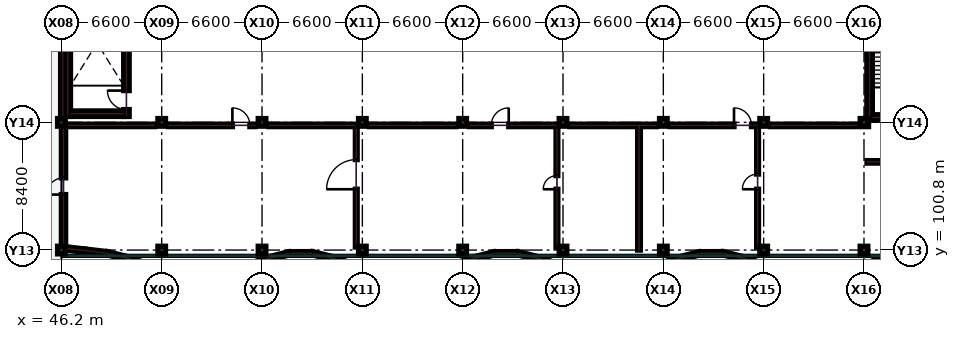
"""IFC4 building model, lengths in metres.
Left out: names, types, materials, properties, quantities, classifications, styles, units other than length and angle.
Written with IfcOpenShell. Run it as: python <this file> out.ifc"""

import sys

from ifc_helpers import new_model, si_unit, direction, frame, frame_2d, origin, origin_2d, place, context, subcontext, project, spatial, rectangle, extrude, element, fill, save


model = new_model("IFC4")
c1 = context("Model", 3, precision=1e-05, world=origin(), true_north=direction((0.0, 1.0)))
c2 = subcontext(c1, "Body", "Model", "MODEL_VIEW")
j1 = project(units=[si_unit("LENGTHUNIT", "METRE"), si_unit("PLANEANGLEUNIT", "RADIAN")], contexts=[c1])
p1 = place(None, origin())
s1 = spatial("IfcSite", under=j1, at=p1, CompositionType="ELEMENT")
p2 = place(p1, origin())
s2 = spatial("IfcBuilding", under=s1, at=p2, CompositionType="ELEMENT")
p3 = place(p2, frame((0.0, 0.0, 18.6)))
s3 = spatial("IfcBuildingStorey", under=s2, at=p3, CompositionType="ELEMENT", Elevation=18.6)
for number, where, z_axis, x_axis in (
    (1, (46.2, 100.8, 0.0), (0.0, 0.0, 1.0), (1.0, 0.0, 0.0)),
    (2, (46.2, 109.2, 0.0), (0.0, 0.0, 1.0), (1.0, 0.0, 0.0)),
    (3, (52.8, 100.8, 0.0), (0.0, 0.0, 1.0), (1.0, 0.0, 0.0)),
    (4, (52.8, 109.2, 0.0), (0.0, 0.0, 1.0), (1.0, 0.0, 0.0)),
    (5, (59.4, 100.8, 0.0), (0.0, 0.0, 1.0), (1.0, 0.0, 0.0)),
    (6, (59.4, 109.2, 0.0), (0.0, 0.0, 1.0), (1.0, 0.0, 0.0)),
    (7, (66.0, 100.8, 0.0), (0.0, 0.0, 1.0), (1.0, 0.0, 0.0)),
    (8, (66.0, 109.2, 0.0), (0.0, 0.0, 1.0), (1.0, 0.0, 0.0)),
    (9, (72.6, 100.8, 0.0), (0.0, 0.0, 1.0), (1.0, 0.0, 0.0)),
    (10, (72.6, 109.2, 0.0), (0.0, 0.0, 1.0), (1.0, 0.0, 0.0)),
    (11, (79.2, 100.8, 0.0), (0.0, 0.0, 1.0), (1.0, 0.0, 0.0)),
    (12, (79.2, 109.2, 0.0), (0.0, 0.0, 1.0), (1.0, 0.0, 0.0)),
    (13, (85.8, 100.8, 0.0), (0.0, 0.0, 1.0), (1.0, 0.0, 0.0)),
    (14, (85.8, 109.2, 0.0), (0.0, 0.0, 1.0), (1.0, 0.0, 0.0)),
    (15, (92.4, 100.8, 0.0), (0.0, 0.0, 1.0), (1.0, 0.0, 0.0)),
    (16, (92.4, 109.2, 0.0), (0.0, 0.0, 1.0), (1.0, 0.0, 0.0)),
    (17, (99.0, 100.8, 0.0), (0.0, 0.0, 1.0), (1.0, 0.0, 0.0)),
    (18, (99.0, 109.2, 0.0), (0.0, 0.0, 1.0), (1.0, 0.0, 0.0)),
):
    element("IfcColumn", number, at=place(p3, frame(where, z_axis=z_axis, x_axis=x_axis)), inside=s3, PredefinedType="COLUMN", context=c2, shape_type="SweptSolid", body=[
        extrude(rectangle(XDim=0.5, YDim=0.5, at=origin_2d()), origin(), (0.0, 0.0, 1.0), 4.2),
    ])
p4 = place(p3, frame((46.48, 109.0, 0.0), z_axis=(0.0, 0.0, 1.0), x_axis=(1.0, 0.0, 0.0)))
e19 = element("IfcWall", 19, at=p4, inside=s3, PredefinedType="PARTITIONING", context=c2, shape_type="SweptSolid", body=[
    extrude(rectangle(XDim=5.87, YDim=0.16, at=frame_2d((2.935, 0.0))), origin(), (0.0, 0.0, 1.0), 3.175),
])
p5 = place(p3, frame((53.25, 109.0, 0.0), z_axis=(0.0, 0.0, 1.0), x_axis=(1.0, 0.0, 0.0)))
e20 = element("IfcWall", 20, at=p5, inside=s3, PredefinedType="PARTITIONING", context=c2, shape_type="SweptSolid", body=[
    extrude(rectangle(XDim=5.7, YDim=0.16, at=frame_2d((2.85, 0.0))), origin(), (0.0, 0.0, 1.0), 3.175),
])
p6 = place(p5, frame((4.2, 0.0, 0.0)))
e21 = element("IfcOpeningElement", 21, at=p6, cuts=e20, PredefinedType="OPENING", context=c2, shape_type="SweptSolid", body=[
    extrude(rectangle(XDim=1.15, YDim=2.2, at=frame_2d((0.575, 1.1))), frame((0.0, 0.09, 0.0), z_axis=(0.0, -1.0, 0.0), x_axis=(1.0, 0.0, 0.0)), (0.0, 0.0, 1.0), 0.18),
])
for number, where, z_axis, x_axis in (
    (22, (59.85, 109.0, 0.0), (0.0, 0.0, 1.0), (1.0, 0.0, 0.0)),
    (23, (66.45, 109.0, 0.0), (0.0, 0.0, 1.0), (1.0, 0.0, 0.0)),
):
    element("IfcWall", number, at=place(p3, frame(where, z_axis=z_axis, x_axis=x_axis)), inside=s3, PredefinedType="PARTITIONING", context=c2, shape_type="SweptSolid", body=[
        extrude(rectangle(XDim=5.7, YDim=0.16, at=frame_2d((2.85, 0.0))), origin(), (0.0, 0.0, 1.0), 3.175),
    ])
p7 = place(p3, frame((73.05, 109.0, 0.0), z_axis=(0.0, 0.0, 1.0), x_axis=(1.0, 0.0, 0.0)))
e24 = element("IfcWall", 24, at=p7, inside=s3, PredefinedType="PARTITIONING", context=c2, shape_type="SweptSolid", body=[
    extrude(rectangle(XDim=5.7, YDim=0.16, at=frame_2d((2.85, 0.0))), origin(), (0.0, 0.0, 1.0), 3.175),
])
p8 = place(p7, frame((1.43, 0.0, 0.0)))
e25 = element("IfcOpeningElement", 25, at=p8, cuts=e24, PredefinedType="OPENING", context=c2, shape_type="SweptSolid", body=[
    extrude(rectangle(XDim=1.15, YDim=2.2, at=frame_2d((0.575, 1.1))), frame((0.0, 0.09, 0.0), z_axis=(0.0, -1.0, 0.0), x_axis=(1.0, 0.0, 0.0)), (0.0, 0.0, 1.0), 0.18),
])
p9 = place(p3, frame((79.65, 109.0, 0.0), z_axis=(0.0, 0.0, 1.0), x_axis=(1.0, 0.0, 0.0)))
e26 = element("IfcWall", 26, at=p9, inside=s3, PredefinedType="PARTITIONING", context=c2, shape_type="SweptSolid", body=[
    extrude(rectangle(XDim=5.7, YDim=0.16, at=frame_2d((2.85, 0.0))), origin(), (0.0, 0.0, 1.0), 3.175),
])
p10 = place(p3, frame((86.25, 109.0, 0.0), z_axis=(0.0, 0.0, 1.0), x_axis=(1.0, 0.0, 0.0)))
e27 = element("IfcWall", 27, at=p10, inside=s3, PredefinedType="PARTITIONING", context=c2, shape_type="SweptSolid", body=[
    extrude(rectangle(XDim=5.7, YDim=0.16, at=frame_2d((2.85, 0.0))), origin(), (0.0, 0.0, 1.0), 3.175),
])
p11 = place(p10, frame((4.2, 0.0, 0.0)))
e28 = element("IfcOpeningElement", 28, at=p11, cuts=e27, PredefinedType="OPENING", context=c2, shape_type="SweptSolid", body=[
    extrude(rectangle(XDim=1.15, YDim=2.2, at=frame_2d((0.575, 1.1))), frame((0.0, 0.09, 0.0), z_axis=(0.0, -1.0, 0.0), x_axis=(1.0, 0.0, 0.0)), (0.0, 0.0, 1.0), 0.18),
])
p12 = place(p3, frame((92.85, 109.0, 0.0), z_axis=(0.0, 0.0, 1.0), x_axis=(1.0, 0.0, 0.0)))
e29 = element("IfcWall", 29, at=p12, inside=s3, PredefinedType="PARTITIONING", context=c2, shape_type="SweptSolid", body=[
    extrude(rectangle(XDim=6.45, YDim=0.16, at=frame_2d((3.225, 0.0))), origin(), (0.0, 0.0, 1.0), 3.175),
])
p13 = place(p3, frame((84.2, 100.8, 0.0), z_axis=(0.0, 0.0, 1.0), x_axis=(0.0, 1.0, 0.0)))
e30 = element("IfcWall", 30, at=p13, inside=s3, PredefinedType="SOLIDWALL", context=c2, shape_type="SweptSolid", body=[
    extrude(rectangle(XDim=8.2, YDim=0.18, at=frame_2d((4.1, 0.0))), origin(), (0.0, 0.0, 1.0), 3.19),
])
p14 = place(p3, frame((65.6, 101.0, 0.0), z_axis=(0.0, 0.0, 1.0), x_axis=(0.0, 1.0, 0.0)))
e31 = element("IfcWall", 31, at=p14, inside=s3, PredefinedType="PARTITIONING", context=c2, shape_type="SweptSolid", body=[
    extrude(rectangle(XDim=8.0, YDim=0.12, at=frame_2d((4.0, 0.0))), origin(), (0.0, 0.0, 1.0), 3.19),
])
p15 = place(p14, frame((3.8, 0.0, 0.0)))
e32 = element("IfcOpeningElement", 32, at=p15, cuts=e31, PredefinedType="OPENING", context=c2, shape_type="SweptSolid", body=[
    extrude(rectangle(XDim=1.95, YDim=2.35, at=frame_2d((0.975, 1.175))), frame((0.0, 0.07, 0.0), z_axis=(0.0, -1.0, 0.0), x_axis=(1.0, 0.0, 0.0)), (0.0, 0.0, 1.0), 0.14),
])
p16 = place(p3, frame((78.8, 101.0, 0.0), z_axis=(0.0, 0.0, 1.0), x_axis=(0.0, 1.0, 0.0)))
e33 = element("IfcWall", 33, at=p16, inside=s3, PredefinedType="PARTITIONING", context=c2, shape_type="SweptSolid", body=[
    extrude(rectangle(XDim=8.0, YDim=0.12, at=frame_2d((4.0, 0.0))), origin(), (0.0, 0.0, 1.0), 3.19),
])
p17 = place(p16, frame((3.8, 0.0, 0.0)))
e34 = element("IfcOpeningElement", 34, at=p17, cuts=e33, PredefinedType="OPENING", context=c2, shape_type="SweptSolid", body=[
    extrude(rectangle(XDim=0.9, YDim=2.1, at=frame_2d((0.45, 1.05))), frame((0.0, 0.07, 0.0), z_axis=(0.0, -1.0, 0.0), x_axis=(1.0, 0.0, 0.0)), (0.0, 0.0, 1.0), 0.14),
])
p18 = place(p3, frame((92.0, 101.0, 0.0), z_axis=(0.0, 0.0, 1.0), x_axis=(0.0, 1.0, 0.0)))
e35 = element("IfcWall", 35, at=p18, inside=s3, PredefinedType="PARTITIONING", context=c2, shape_type="SweptSolid", body=[
    extrude(rectangle(XDim=8.0, YDim=0.12, at=frame_2d((4.0, 0.0))), origin(), (0.0, 0.0, 1.0), 3.19),
])
p19 = place(p18, frame((3.8, 0.0, 0.0)))
e36 = element("IfcOpeningElement", 36, at=p19, cuts=e35, PredefinedType="OPENING", context=c2, shape_type="SweptSolid", body=[
    extrude(rectangle(XDim=1.0, YDim=2.2, at=frame_2d((0.5, 1.1))), frame((0.0, 0.07, 0.0), z_axis=(0.0, -1.0, 0.0), x_axis=(1.0, 0.0, 0.0)), (0.0, 0.0, 1.0), 0.14),
])
p20 = place(p3, frame((99.2, 106.6, 0.0), z_axis=(0.0, 0.0, 1.0), x_axis=(1.0, 0.0, 0.0)))
e37 = element("IfcWall", 37, at=p20, inside=s3, PredefinedType="PARTITIONING", context=c2, shape_type="SweptSolid", body=[
    extrude(rectangle(XDim=12.9, YDim=0.16, at=frame_2d((6.45, 0.0))), origin(), (0.0, 0.0, 1.0), 3.19),
])
p21 = place(p20, frame((4.2, 0.0, 0.0)))
e38 = element("IfcOpeningElement", 38, at=p21, cuts=e37, PredefinedType="OPENING", context=c2, shape_type="SweptSolid", body=[
    extrude(rectangle(XDim=1.05, YDim=2.15, at=frame_2d((0.525, 1.075))), frame((0.0, 0.09, 0.0), z_axis=(0.0, -1.0, 0.0), x_axis=(1.0, 0.0, 0.0)), (0.0, 0.0, 1.0), 0.18),
])
p22 = place(p3, frame((46.34, 108.955, 0.0), z_axis=(0.0, 0.0, 1.0), x_axis=(0.0, -1.0, 0.0)))
e39 = element("IfcWall", 39, at=p22, inside=s3, PredefinedType="SOLIDWALL", context=c2, shape_type="SweptSolid", body=[
    extrude(rectangle(XDim=7.91, YDim=0.28, at=frame_2d((3.955, 0.0))), origin(), (0.0, 0.0, 1.0), 3.325),
])
p23 = place(p22, frame((3.405, 0.0, 0.0)))
e40 = element("IfcOpeningElement", 40, at=p23, cuts=e39, PredefinedType="OPENING", context=c2, shape_type="SweptSolid", body=[
    extrude(rectangle(XDim=1.1, YDim=2.2, at=frame_2d((0.55, 1.1))), frame((0.0, 0.15, 0.0), z_axis=(0.0, -1.0, 0.0), x_axis=(1.0, 0.0, 0.0)), (0.0, 0.0, 1.0), 0.3),
])
p24 = place(p3, frame((46.29, 117.355, 0.0), z_axis=(0.0, 0.0, 1.0), x_axis=(0.0, -1.0, 0.0)))
e41 = element("IfcWall", 41, at=p24, inside=s3, PredefinedType="SOLIDWALL", context=c2, shape_type="SweptSolid", body=[
    extrude(rectangle(XDim=7.91, YDim=0.28, at=frame_2d((3.955, 0.0))), origin(), (0.0, 0.0, 1.0), 3.325),
])
for number, where, z_axis, x_axis in (
    (42, (46.215, 100.94, 0.0), (0.0, 0.0, 1.0), (0.993, -0.116, 0.0)),
    (43, (47.715, 100.765, 0.0), (0.0, 0.0, 1.0), (0.993, -0.116, 0.0)),
):
    element("IfcWall", number, at=place(p3, frame(where, z_axis=z_axis, x_axis=x_axis)), inside=s3, PredefinedType="SOLIDWALL", context=c2, shape_type="SweptSolid", body=[
        extrude(rectangle(XDim=1.51, YDim=0.22, at=frame_2d((0.755, 0.0))), origin(), (0.0, 0.0, 1.0), 1.45),
    ])
p25 = place(p3, frame((49.235, 100.585, 0.0), z_axis=(0.0, 0.0, 1.0), x_axis=(0.970918311966, -0.239411009542, 0.0)))
e44 = element("IfcWall", 44, at=p25, inside=s3, PredefinedType="SOLIDWALL", context=c2, shape_type="SweptSolid", body=[
    extrude(rectangle(XDim=1.545, YDim=0.22, at=frame_2d((0.772, 0.0))), origin(), (0.0, 0.0, 1.0), 1.45),
])
p26 = place(p3, frame((50.75, 100.21, 0.0), z_axis=(0.0, 0.0, 1.0), x_axis=(0.933756275822, -0.35790951002, 0.0)))
e45 = element("IfcWall", 45, at=p26, inside=s3, PredefinedType="SOLIDWALL", context=c2, shape_type="SweptSolid", body=[
    extrude(rectangle(XDim=1.606, YDim=0.22, at=frame_2d((0.803, 0.0))), origin(), (0.0, 0.0, 1.0), 1.45),
])
p27 = place(p3, frame((58.15, 99.63, 0.0), z_axis=(0.0, 0.0, 1.0), x_axis=(0.934769434387, 0.355254985237, 0.0)))
e46 = element("IfcWall", 46, at=p27, inside=s3, PredefinedType="SOLIDWALL", context=c2, shape_type="SweptSolid", body=[
    extrude(rectangle(XDim=1.605, YDim=0.22, at=frame_2d((0.802, 0.0))), origin(), (0.0, 0.0, 1.0), 1.45),
])
p28 = place(p3, frame((59.665, 100.205, 0.0), z_axis=(0.0, 0.0, 1.0), x_axis=(0.970142500145, 0.242535625036, 0.0)))
e47 = element("IfcWall", 47, at=p28, inside=s3, PredefinedType="SOLIDWALL", context=c2, shape_type="SweptSolid", body=[
    extrude(rectangle(XDim=1.546, YDim=0.22, at=frame_2d((0.773, 0.0))), origin(), (0.0, 0.0, 1.0), 1.45),
])
p29 = place(p3, frame((61.2, 100.585, 0.0), z_axis=(0.0, 0.0, 1.0), x_axis=(0.999994158796, 0.003417948785, 0.0)))
e48 = element("IfcWall", 48, at=p29, inside=s3, PredefinedType="SOLIDWALL", context=c2, shape_type="SweptSolid", body=[
    extrude(rectangle(XDim=1.5, YDim=0.22, at=frame_2d((0.75, 0.0))), origin(), (0.0, 0.0, 1.0), 1.45),
])
p30 = place(p3, frame((62.735, 100.585, 0.0), z_axis=(0.0, 0.0, 1.0), x_axis=(0.970918311966, -0.239411009542, 0.0)))
e49 = element("IfcWall", 49, at=p30, inside=s3, PredefinedType="SOLIDWALL", context=c2, shape_type="SweptSolid", body=[
    extrude(rectangle(XDim=1.545, YDim=0.22, at=frame_2d((0.772, 0.0))), origin(), (0.0, 0.0, 1.0), 1.45),
])
p31 = place(p3, frame((64.25, 100.21, 0.0), z_axis=(0.0, 0.0, 1.0), x_axis=(0.933756275822, -0.35790951002, 0.0)))
e50 = element("IfcWall", 50, at=p31, inside=s3, PredefinedType="SOLIDWALL", context=c2, shape_type="SweptSolid", body=[
    extrude(rectangle(XDim=1.606, YDim=0.22, at=frame_2d((0.803, 0.0))), origin(), (0.0, 0.0, 1.0), 1.45),
])
p32 = place(p3, frame((71.65, 99.63, 0.0), z_axis=(0.0, 0.0, 1.0), x_axis=(0.934769434387, 0.355254985237, 0.0)))
e51 = element("IfcWall", 51, at=p32, inside=s3, PredefinedType="SOLIDWALL", context=c2, shape_type="SweptSolid", body=[
    extrude(rectangle(XDim=1.605, YDim=0.22, at=frame_2d((0.802, 0.0))), origin(), (0.0, 0.0, 1.0), 1.45),
])
p33 = place(p3, frame((73.165, 100.205, 0.0), z_axis=(0.0, 0.0, 1.0), x_axis=(0.970142500145, 0.242535625036, 0.0)))
e52 = element("IfcWall", 52, at=p33, inside=s3, PredefinedType="SOLIDWALL", context=c2, shape_type="SweptSolid", body=[
    extrude(rectangle(XDim=1.546, YDim=0.22, at=frame_2d((0.773, 0.0))), origin(), (0.0, 0.0, 1.0), 1.45),
])
p34 = place(p3, frame((74.7, 100.585, 0.0), z_axis=(0.0, 0.0, 1.0), x_axis=(0.999994158796, 0.003417948785, 0.0)))
e53 = element("IfcWall", 53, at=p34, inside=s3, PredefinedType="SOLIDWALL", context=c2, shape_type="SweptSolid", body=[
    extrude(rectangle(XDim=1.5, YDim=0.22, at=frame_2d((0.75, 0.0))), origin(), (0.0, 0.0, 1.0), 1.45),
])
p35 = place(p3, frame((76.235, 100.585, 0.0), z_axis=(0.0, 0.0, 1.0), x_axis=(0.970918311966, -0.239411009542, 0.0)))
e54 = element("IfcWall", 54, at=p35, inside=s3, PredefinedType="SOLIDWALL", context=c2, shape_type="SweptSolid", body=[
    extrude(rectangle(XDim=1.545, YDim=0.22, at=frame_2d((0.772, 0.0))), origin(), (0.0, 0.0, 1.0), 1.45),
])
p36 = place(p3, frame((77.75, 100.21, 0.0), z_axis=(0.0, 0.0, 1.0), x_axis=(0.933756275822, -0.35790951002, 0.0)))
e55 = element("IfcWall", 55, at=p36, inside=s3, PredefinedType="SOLIDWALL", context=c2, shape_type="SweptSolid", body=[
    extrude(rectangle(XDim=1.606, YDim=0.22, at=frame_2d((0.803, 0.0))), origin(), (0.0, 0.0, 1.0), 1.45),
])
p37 = place(p3, frame((85.15, 99.63, 0.0), z_axis=(0.0, 0.0, 1.0), x_axis=(0.934769434387, 0.355254985237, 0.0)))
e56 = element("IfcWall", 56, at=p37, inside=s3, PredefinedType="SOLIDWALL", context=c2, shape_type="SweptSolid", body=[
    extrude(rectangle(XDim=1.605, YDim=0.22, at=frame_2d((0.802, 0.0))), origin(), (0.0, 0.0, 1.0), 1.45),
])
p38 = place(p3, frame((86.665, 100.205, 0.0), z_axis=(0.0, 0.0, 1.0), x_axis=(0.970142500145, 0.242535625036, 0.0)))
e57 = element("IfcWall", 57, at=p38, inside=s3, PredefinedType="SOLIDWALL", context=c2, shape_type="SweptSolid", body=[
    extrude(rectangle(XDim=1.546, YDim=0.22, at=frame_2d((0.773, 0.0))), origin(), (0.0, 0.0, 1.0), 1.45),
])
p39 = place(p3, frame((88.2, 100.585, 0.0), z_axis=(0.0, 0.0, 1.0), x_axis=(0.999994158796, 0.003417948785, 0.0)))
e58 = element("IfcWall", 58, at=p39, inside=s3, PredefinedType="SOLIDWALL", context=c2, shape_type="SweptSolid", body=[
    extrude(rectangle(XDim=1.5, YDim=0.22, at=frame_2d((0.75, 0.0))), origin(), (0.0, 0.0, 1.0), 1.45),
])
p40 = place(p3, frame((89.735, 100.585, 0.0), z_axis=(0.0, 0.0, 1.0), x_axis=(0.970918311966, -0.239411009542, 0.0)))
e59 = element("IfcWall", 59, at=p40, inside=s3, PredefinedType="SOLIDWALL", context=c2, shape_type="SweptSolid", body=[
    extrude(rectangle(XDim=1.545, YDim=0.22, at=frame_2d((0.772, 0.0))), origin(), (0.0, 0.0, 1.0), 1.45),
])
p41 = place(p3, frame((91.25, 100.21, 0.0), z_axis=(0.0, 0.0, 1.0), x_axis=(0.933756275822, -0.35790951002, 0.0)))
e60 = element("IfcWall", 60, at=p41, inside=s3, PredefinedType="SOLIDWALL", context=c2, shape_type="SweptSolid", body=[
    extrude(rectangle(XDim=1.606, YDim=0.22, at=frame_2d((0.803, 0.0))), origin(), (0.0, 0.0, 1.0), 1.45),
])
p42 = place(p3, frame((98.65, 99.63, 0.0), z_axis=(0.0, 0.0, 1.0), x_axis=(0.934769434387, 0.355254985237, 0.0)))
e61 = element("IfcWall", 61, at=p42, inside=s3, PredefinedType="SOLIDWALL", context=c2, shape_type="SweptSolid", body=[
    extrude(rectangle(XDim=1.605, YDim=0.22, at=frame_2d((0.802, 0.0))), origin(), (0.0, 0.0, 1.0), 1.45),
])
p43 = place(p3, frame((99.37, 109.34, 0.0), z_axis=(0.0, 0.0, 1.0), x_axis=(0.0, 1.0, 0.0)))
e62 = element("IfcWall", 62, at=p43, inside=s3, PredefinedType="SHEAR", context=c2, shape_type="SweptSolid", body=[
    extrude(rectangle(XDim=8.09, YDim=0.36, at=frame_2d((4.045, 0.0))), origin(), (0.0, 0.0, 1.0), 3.94),
])
p44 = place(p3, frame((99.55, 109.52, 0.0), z_axis=(0.0, 0.0, 1.0), x_axis=(1.0, 0.0, 0.0)))
e63 = element("IfcWall", 63, at=p44, inside=s3, PredefinedType="SHEAR", context=c2, shape_type="SweptSolid", body=[
    extrude(rectangle(XDim=3.8, YDim=0.36, at=frame_2d((1.9, 0.0))), origin(), (0.0, 0.0, 1.0), 3.94),
])
p45 = place(p3, frame((46.62, 109.59, 0.0), z_axis=(0.0, 0.0, 1.0), x_axis=(0.0, 1.0, 0.0)))
e64 = element("IfcWall", 64, at=p45, inside=s3, PredefinedType="SHEAR", context=c2, shape_type="SweptSolid", body=[
    extrude(rectangle(XDim=7.84, YDim=0.36, at=frame_2d((3.92, 0.0))), origin(), (0.0, 0.0, 1.0), 3.94),
])
p46 = place(p3, frame((50.48, 109.59, 0.0), z_axis=(0.0, 0.0, 1.0), x_axis=(0.0, 1.0, 0.0)))
e65 = element("IfcWall", 65, at=p46, inside=s3, PredefinedType="SHEAR", context=c2, shape_type="SweptSolid", body=[
    extrude(rectangle(XDim=7.84, YDim=0.36, at=frame_2d((3.92, 0.0))), origin(), (0.0, 0.0, 1.0), 3.94),
])
p47 = place(p46, frame((0.45, 0.0, 0.0)))
e66 = element("IfcOpeningElement", 66, at=p47, cuts=e65, PredefinedType="OPENING", context=c2, shape_type="SweptSolid", body=[
    extrude(rectangle(XDim=1.25, YDim=2.15, at=frame_2d((0.625, 1.075))), frame((0.0, 0.19, 0.0), z_axis=(0.0, -1.0, 0.0), x_axis=(1.0, 0.0, 0.0)), (0.0, 0.0, 1.0), 0.38),
])
p48 = place(p3, frame((46.8, 109.77, 0.0), z_axis=(0.0, 0.0, 1.0), x_axis=(1.0, 0.0, 0.0)))
e67 = element("IfcWall", 67, at=p48, inside=s3, PredefinedType="SHEAR", context=c2, shape_type="SweptSolid", body=[
    extrude(rectangle(XDim=3.5, YDim=0.36, at=frame_2d((1.75, 0.0))), origin(), (0.0, 0.0, 1.0), 3.94),
])
p49 = place(p6, origin())
e68 = element("IfcDoor", 68, at=p49, inside=s3, OperationType="SINGLE_SWING_LEFT", PredefinedType="DOOR", context=c2, shape_type="SweptSolid", body=[
    extrude(rectangle(XDim=1.15, YDim=2.2, at=frame_2d((0.575, 1.1))), frame((0.0, 0.025, 0.0), z_axis=(0.0, -1.0, 0.0), x_axis=(1.0, 0.0, 0.0)), (0.0, 0.0, 1.0), 0.05),
])
fill(e21, e68)
p50 = place(p8, origin())
e69 = element("IfcDoor", 69, at=p50, inside=s3, OperationType="SINGLE_SWING_RIGHT", PredefinedType="DOOR", context=c2, shape_type="SweptSolid", body=[
    extrude(rectangle(XDim=1.15, YDim=2.2, at=frame_2d((0.575, 1.1))), frame((0.0, 0.025, 0.0), z_axis=(0.0, -1.0, 0.0), x_axis=(1.0, 0.0, 0.0)), (0.0, 0.0, 1.0), 0.05),
])
fill(e25, e69)
p51 = place(p11, origin())
e70 = element("IfcDoor", 70, at=p51, inside=s3, OperationType="SINGLE_SWING_LEFT", PredefinedType="DOOR", context=c2, shape_type="SweptSolid", body=[
    extrude(rectangle(XDim=1.15, YDim=2.2, at=frame_2d((0.575, 1.1))), frame((0.0, 0.025, 0.0), z_axis=(0.0, -1.0, 0.0), x_axis=(1.0, 0.0, 0.0)), (0.0, 0.0, 1.0), 0.05),
])
fill(e28, e70)
p52 = place(p15, origin())
e71 = element("IfcDoor", 71, at=p52, inside=s3, OperationType="SINGLE_SWING_LEFT", PredefinedType="DOOR", context=c2, shape_type="SweptSolid", body=[
    extrude(rectangle(XDim=1.95, YDim=2.35, at=frame_2d((0.975, 1.175))), frame((0.0, 0.025, 0.0), z_axis=(0.0, -1.0, 0.0), x_axis=(1.0, 0.0, 0.0)), (0.0, 0.0, 1.0), 0.05),
])
fill(e32, e71)
p53 = place(p17, origin())
e72 = element("IfcDoor", 72, at=p53, inside=s3, OperationType="SINGLE_SWING_LEFT", PredefinedType="DOOR", context=c2, shape_type="SweptSolid", body=[
    extrude(rectangle(XDim=0.9, YDim=2.1, at=frame_2d((0.45, 1.05))), frame((0.0, 0.025, 0.0), z_axis=(0.0, -1.0, 0.0), x_axis=(1.0, 0.0, 0.0)), (0.0, 0.0, 1.0), 0.05),
])
fill(e34, e72)
p54 = place(p19, origin())
e73 = element("IfcDoor", 73, at=p54, inside=s3, OperationType="SINGLE_SWING_LEFT", PredefinedType="DOOR", context=c2, shape_type="SweptSolid", body=[
    extrude(rectangle(XDim=1.0, YDim=2.2, at=frame_2d((0.5, 1.1))), frame((0.0, 0.025, 0.0), z_axis=(0.0, -1.0, 0.0), x_axis=(1.0, 0.0, 0.0)), (0.0, 0.0, 1.0), 0.05),
])
fill(e36, e73)
p55 = place(p23, frame((1.1, 0.0, 0.0), z_axis=(0.0, 0.0, 1.0), x_axis=(-1.0, 0.0, 0.0)))
e74 = element("IfcDoor", 74, at=p55, inside=s3, OperationType="SINGLE_SWING_RIGHT", PredefinedType="DOOR", context=c2, shape_type="SweptSolid", body=[
    extrude(rectangle(XDim=1.1, YDim=2.2, at=frame_2d((0.55, 1.1))), frame((0.0, 0.025, 0.0), z_axis=(0.0, -1.0, 0.0), x_axis=(1.0, 0.0, 0.0)), (0.0, 0.0, 1.0), 0.05),
])
fill(e40, e74)
p56 = place(p47, origin())
e75 = element("IfcDoor", 75, at=p56, inside=s3, OperationType="SINGLE_SWING_RIGHT", PredefinedType="DOOR", context=c2, shape_type="SweptSolid", body=[
    extrude(rectangle(XDim=1.25, YDim=2.15, at=frame_2d((0.625, 1.075))), frame((0.0, 0.025, 0.0), z_axis=(0.0, -1.0, 0.0), x_axis=(1.0, 0.0, 0.0)), (0.0, 0.0, 1.0), 0.05),
])
fill(e66, e75)
save(model, sys.argv[1])
